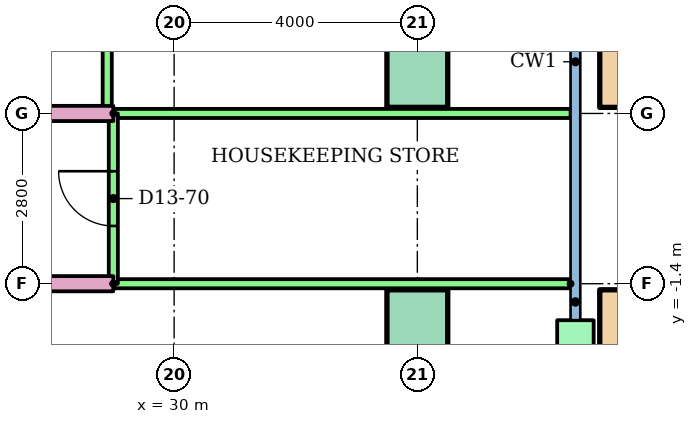
"""IFC4 building model, lengths in metres.
Left out: names, types, materials, properties, quantities, classifications, styles, units other than length and angle.
Written with IfcOpenShell. Run it as: python <this file> out.ifc"""

import sys

from ifc_helpers import new_model, si_unit, direction, frame, frame_2d, origin, origin_2d, place, context, subcontext, project, spatial, rectangle, hollow_rectangle, extrude, element, fill, save


model = new_model("IFC4")
c1 = context("Model", 3, precision=1e-05, world=origin(), true_north=direction((0.0, 1.0)))
c2 = subcontext(c1, "Body", "Model", "MODEL_VIEW")
j1 = project(units=[si_unit("LENGTHUNIT", "METRE"), si_unit("PLANEANGLEUNIT", "RADIAN")], contexts=[c1])
p1 = place(None, origin())
s1 = spatial("IfcSite", under=j1, at=p1, CompositionType="ELEMENT")
p2 = place(p1, origin())
s2 = spatial("IfcBuilding", under=s1, at=p2, CompositionType="ELEMENT")
p3 = place(p2, frame((0.0, 0.0, 51.2)))
s3 = spatial("IfcBuildingStorey", under=s2, at=p3, CompositionType="ELEMENT", Elevation=51.2)
p4 = place(p3, frame((34.0, -2.0, 0.0)))
e1 = element("IfcColumn", 1, at=p4, inside=s3, PredefinedType="COLUMN", context=c2, shape_type="SweptSolid", body=[
    extrude(rectangle(XDim=1.0, YDim=1.0, at=origin_2d()), origin(), (0.0, 0.0, 1.0), 3.2),
])
p5 = place(p3, frame((37.5, -2.0, 0.0)))
e2 = element("IfcColumn", 2, at=p5, inside=s3, PredefinedType="COLUMN", context=c2, shape_type="SweptSolid", body=[
    extrude(hollow_rectangle(XDim=1.0, YDim=1.0, WallThickness=0.05, at=origin_2d()), origin(), (0.0, 0.0, 1.0), 3.2),
])
p6 = place(p3, frame((34.0, 2.0, 0.0)))
e3 = element("IfcColumn", 3, at=p6, inside=s3, PredefinedType="COLUMN", context=c2, shape_type="SweptSolid", body=[
    extrude(rectangle(XDim=1.0, YDim=1.0, at=origin_2d()), origin(), (0.0, 0.0, 1.0), 3.2),
])
p7 = place(p3, frame((37.5, 2.0, 0.0)))
e4 = element("IfcColumn", 4, at=p7, inside=s3, PredefinedType="COLUMN", context=c2, shape_type="SweptSolid", body=[
    extrude(hollow_rectangle(XDim=1.0, YDim=1.0, WallThickness=0.05, at=origin_2d()), origin(), (0.0, 0.0, 1.0), 3.2),
])
p8 = place(p3, frame((36.6, -5.7, 0.0), z_axis=(0.0, 0.0, 1.0), x_axis=(0.0, 1.0, 0.0)))
e5 = element("IfcWall", 5, at=p8, inside=s3, PredefinedType="STANDARD", context=c2, shape_type="SweptSolid", body=[
    extrude(rectangle(XDim=3.7, YDim=0.6, at=frame_2d((1.85, 0.0))), origin(), (0.0, 0.0, 1.0), 2.92),
])
p9 = place(p8, frame((1.25, 0.0, 0.0)))
e6 = element("IfcOpeningElement", 6, at=p9, cuts=e5, PredefinedType="OPENING", context=c2, shape_type="SweptSolid", body=[
    extrude(rectangle(XDim=1.2, YDim=2.1, at=frame_2d((0.6, 1.05))), frame((0.0, 0.31, 0.0), z_axis=(0.0, -1.0, 0.0), x_axis=(1.0, 0.0, 0.0)), (0.0, 0.0, 1.0), 0.62),
])
p10 = place(p3, frame((29.0, -1.4, 0.0), z_axis=(0.0, 0.0, 1.0), x_axis=(-1.0, 0.0, 0.0)))
e7 = element("IfcWall", 7, at=p10, inside=s3, PredefinedType="PARTITIONING", context=c2, shape_type="SweptSolid", body=[
    extrude(rectangle(XDim=15.0, YDim=0.25, at=frame_2d((7.5, 0.0))), origin(), (0.0, 0.0, 1.0), 2.4),
])
p11 = place(p3, frame((36.52, -1.4, 0.0), z_axis=(0.0, 0.0, 1.0), x_axis=(-1.0, 0.0, 0.0)))
e8 = element("IfcWall", 8, at=p11, inside=s3, PredefinedType="PARTITIONING", context=c2, shape_type="SweptSolid", body=[
    extrude(rectangle(XDim=7.52, YDim=0.15, at=frame_2d((3.76, 0.0))), origin(), (0.0, 0.0, 1.0), 2.4),
])
p12 = place(p3, frame((28.9, 11.4, 0.0), z_axis=(0.0, 0.0, 1.0), x_axis=(0.0, -1.0, 0.0)))
e9 = element("IfcWall", 9, at=p12, inside=s3, PredefinedType="PARTITIONING", context=c2, shape_type="SweptSolid", body=[
    extrude(rectangle(XDim=10.0, YDim=0.15, at=frame_2d((5.0, 0.0))), origin(), (0.0, 0.0, 1.0), 2.4),
])
p13 = place(p3, frame((14.0, 1.4, 0.0)))
e10 = element("IfcWall", 10, at=p13, inside=s3, PredefinedType="PARTITIONING", context=c2, shape_type="SweptSolid", body=[
    extrude(rectangle(XDim=15.0, YDim=0.25, at=frame_2d((7.5, 0.0))), origin(), (0.0, 0.0, 1.0), 2.4),
])
p14 = place(p13, frame((0.5, 0.0, 0.0)))
e11 = element("IfcOpeningElement", 11, at=p14, cuts=e10, PredefinedType="OPENING", context=c2, shape_type="SweptSolid", body=[
    extrude(rectangle(XDim=1.0, YDim=2.1, at=frame_2d((0.5, 1.05))), frame((0.0, 0.135, 0.0), z_axis=(0.0, -1.0, 0.0), x_axis=(1.0, 0.0, 0.0)), (0.0, 0.0, 1.0), 0.27),
])
p15 = place(p3, frame((29.0, 1.4, 0.0)))
e12 = element("IfcWall", 12, at=p15, inside=s3, PredefinedType="PARTITIONING", context=c2, shape_type="SweptSolid", body=[
    extrude(rectangle(XDim=7.52, YDim=0.15, at=frame_2d((3.76, 0.0))), origin(), (0.0, 0.0, 1.0), 2.4),
])
p16 = place(p3, frame((29.0, -1.4, 0.0), z_axis=(0.0, 0.0, 1.0), x_axis=(0.0, 1.0, 0.0)))
e13 = element("IfcWall", 13, at=p16, inside=s3, PredefinedType="PARTITIONING", context=c2, shape_type="SweptSolid", body=[
    extrude(rectangle(XDim=2.8, YDim=0.15, at=frame_2d((1.4, 0.0))), origin(), (0.0, 0.0, 1.0), 2.4),
])
p17 = place(p16, frame((0.95, 0.0, 0.0)))
e14 = element("IfcOpeningElement", 14, at=p17, cuts=e13, PredefinedType="OPENING", context=c2, shape_type="SweptSolid", body=[
    extrude(rectangle(XDim=0.9, YDim=2.1, at=frame_2d((0.45, 1.05))), frame((0.0, 0.085, 0.0), z_axis=(0.0, -1.0, 0.0), x_axis=(1.0, 0.0, 0.0)), (0.0, 0.0, 1.0), 0.17),
])
p18 = place(p17, origin())
e15 = element("IfcDoor", 15, at=p18, inside=s3, OperationType="SINGLE_SWING_RIGHT", PredefinedType="DOOR", context=c2, shape_type="SweptSolid", body=[
    extrude(rectangle(XDim=0.9, YDim=2.1, at=frame_2d((0.45, 1.05))), frame((0.0, 0.025, 0.0), z_axis=(0.0, -1.0, 0.0), x_axis=(1.0, 0.0, 0.0)), (0.0, 0.0, 1.0), 0.05),
])
fill(e14, e15)
save(model, sys.argv[1])
